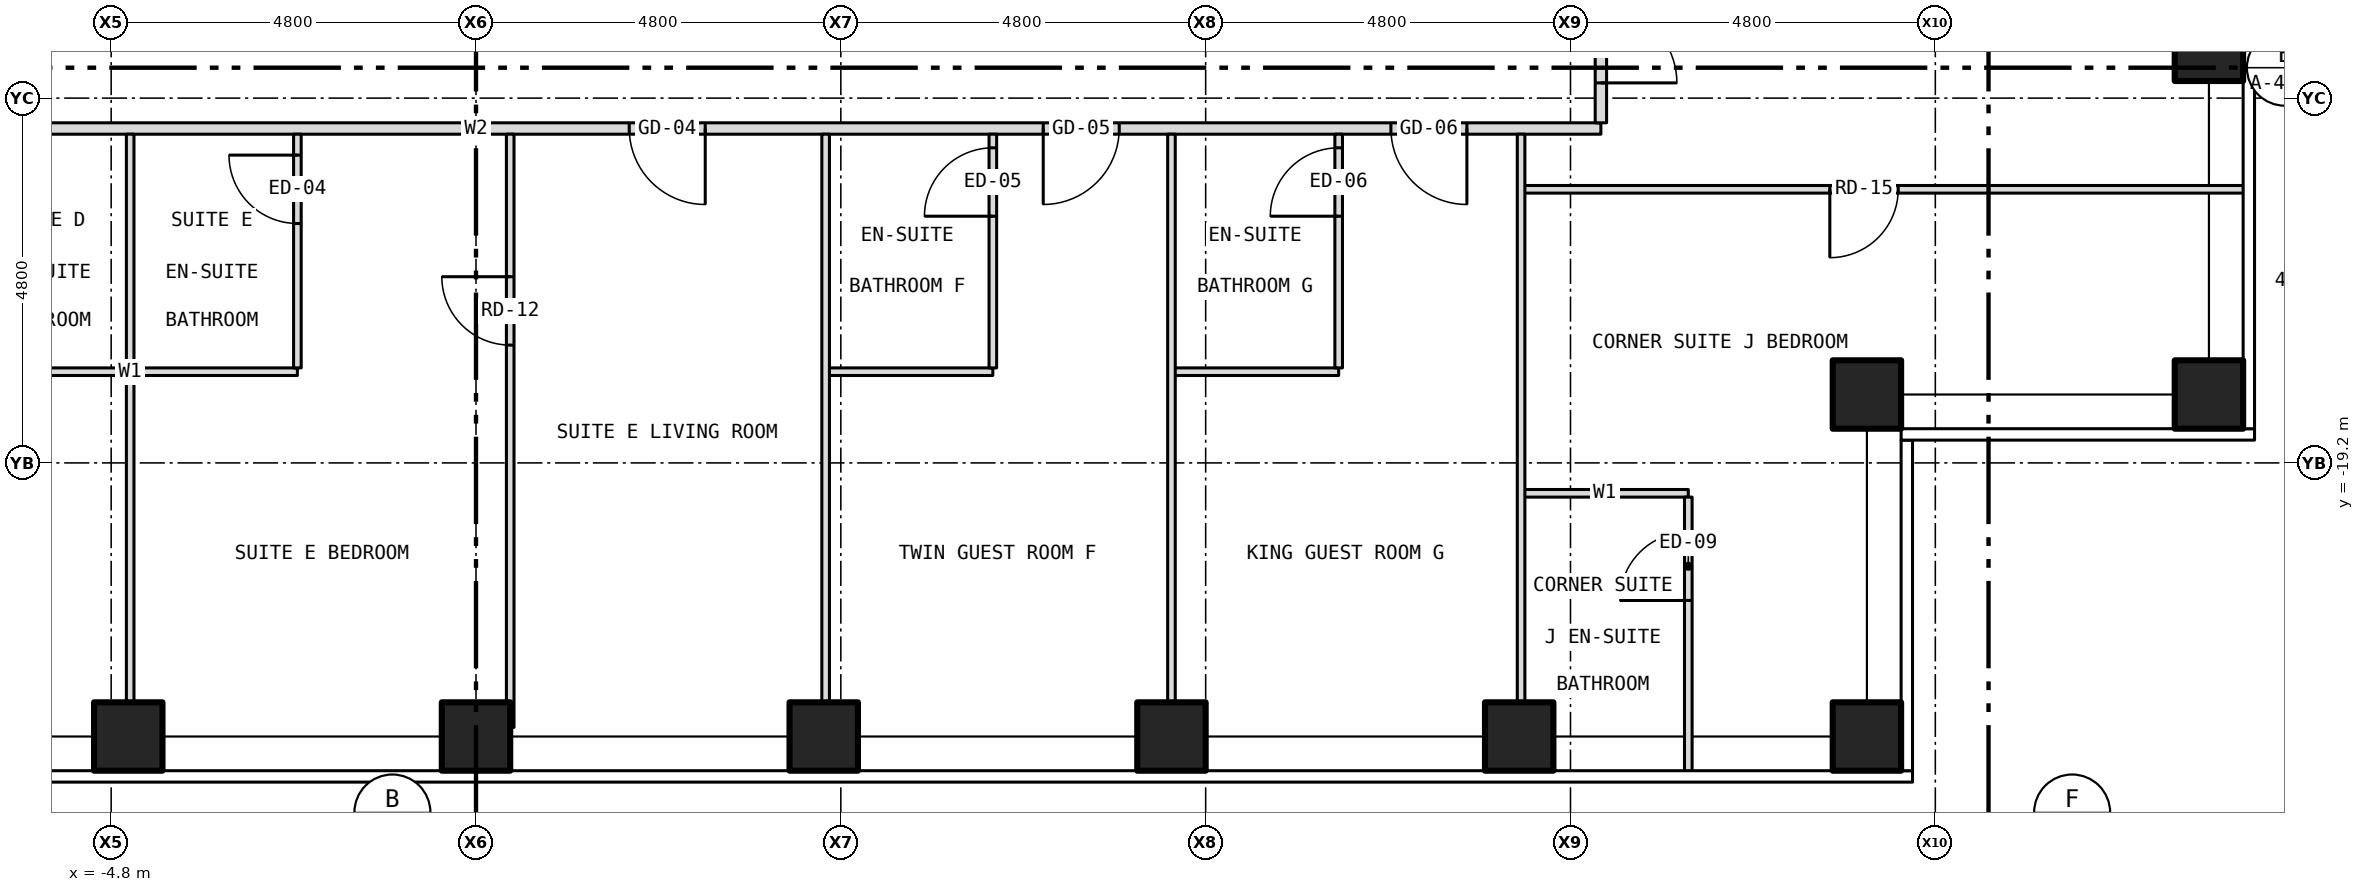
"""IFC4 building model, lengths in metres.
Left out: names, types, materials, properties, quantities, classifications, styles, units other than length and angle.
Written with IfcOpenShell. Run it as: python <this file> out.ifc"""

import sys

from ifc_helpers import new_model, si_unit, direction, frame, frame_2d, origin, origin_2d, place, context, subcontext, project, spatial, rectangle, hollow_rectangle, extrude, element, fill, save


model = new_model("IFC4")
c1 = context("Model", 3, precision=1e-05, world=origin(), true_north=direction((0.0, 1.0)))
c2 = subcontext(c1, "Body", "Model", "MODEL_VIEW")
j1 = project(units=[si_unit("LENGTHUNIT", "METRE"), si_unit("PLANEANGLEUNIT", "RADIAN")], contexts=[c1])
p1 = place(None, origin())
s1 = spatial("IfcSite", under=j1, at=p1, CompositionType="ELEMENT")
p2 = place(p1, origin())
s2 = spatial("IfcBuilding", under=s1, at=p2, CompositionType="ELEMENT")
p3 = place(p2, frame((0.0, 0.0, 99.5)))
s3 = spatial("IfcBuildingStorey", under=s2, at=p3, CompositionType="ELEMENT", Elevation=99.5)
for number, where, z_axis, x_axis in (
    (1, (-4.575, -22.8, -0.15), (0.0, 0.0, 1.0), (1.0, 0.0, 0.0)),
    (2, (0.0, -22.8, -0.15), (0.0, 0.0, 1.0), (1.0, 0.0, 0.0)),
    (3, (4.575, -22.8, -0.15), (0.0, 0.0, 1.0), (1.0, 0.0, 0.0)),
    (4, (9.15, -22.8, -0.15), (0.0, 0.0, 1.0), (1.0, 0.0, 0.0)),
    (5, (13.725, -22.8, -0.15), (0.0, 0.0, 1.0), (1.0, 0.0, 0.0)),
    (6, (18.3, -22.8, -0.15), (0.0, 0.0, 1.0), (1.0, 0.0, 0.0)),
    (7, (22.8, -18.3, -0.15), (0.0, 0.0, 1.0), (1.0, 0.0, 0.0)),
    (8, (22.8, -13.725, -0.15), (0.0, 0.0, 1.0), (1.0, 0.0, 0.0)),
    (9, (18.3, -18.3, -0.15), (0.0, 0.0, 1.0), (1.0, 0.0, 0.0)),
):
    element("IfcColumn", number, at=place(p3, frame(where, z_axis=z_axis, x_axis=x_axis)), inside=s3, PredefinedType="COLUMN", context=c2, shape_type="SweptSolid", body=[
        extrude(hollow_rectangle(XDim=0.9, YDim=0.9, WallThickness=0.05, at=origin_2d()), origin(), (0.0, 0.0, 1.0), 3.5),
    ])
p4 = place(p3, frame((13.75, -19.6, 0.0), z_axis=(0.0, 0.0, 1.0), x_axis=(1.0, 0.0, 0.0)))
e10 = element("IfcWall", 10, at=p4, inside=s3, PredefinedType="PARTITIONING", context=c2, shape_type="SweptSolid", body=[
    extrude(rectangle(XDim=2.2, YDim=0.1, at=frame_2d((1.1, 0.0))), origin(), (0.0, 0.0, 1.0), 3.35),
])
p5 = place(p3, frame((-6.75, -18.0, 0.0), z_axis=(0.0, 0.0, 1.0), x_axis=(1.0, 0.0, 0.0)))
e11 = element("IfcWall", 11, at=p5, inside=s3, PredefinedType="PARTITIONING", context=c2, shape_type="SweptSolid", body=[
    extrude(rectangle(XDim=4.4, YDim=0.1, at=frame_2d((2.2, 0.0))), origin(), (0.0, 0.0, 1.0), 3.35),
])
p6 = place(p3, frame((4.6, -18.0, 0.0), z_axis=(0.0, 0.0, 1.0), x_axis=(1.0, 0.0, 0.0)))
e12 = element("IfcWall", 12, at=p6, inside=s3, PredefinedType="PARTITIONING", context=c2, shape_type="SweptSolid", body=[
    extrude(rectangle(XDim=2.2, YDim=0.1, at=frame_2d((1.1, 0.0))), origin(), (0.0, 0.0, 1.0), 3.35),
])
p7 = place(p3, frame((9.15, -18.0, 0.0), z_axis=(0.0, 0.0, 1.0), x_axis=(1.0, 0.0, 0.0)))
e13 = element("IfcWall", 13, at=p7, inside=s3, PredefinedType="PARTITIONING", context=c2, shape_type="SweptSolid", body=[
    extrude(rectangle(XDim=2.2, YDim=0.1, at=frame_2d((1.1, 0.0))), origin(), (0.0, 0.0, 1.0), 3.35),
])
p8 = place(p3, frame((13.75, -15.6, 0.0), z_axis=(0.0, 0.0, 1.0), x_axis=(1.0, 0.0, 0.0)))
e14 = element("IfcWall", 14, at=p8, inside=s3, PredefinedType="PARTITIONING", context=c2, shape_type="SweptSolid", body=[
    extrude(rectangle(XDim=9.53, YDim=0.1, at=frame_2d((4.765, 0.0))), origin(), (0.0, 0.0, 1.0), 3.35),
])
p9 = place(p8, frame((4.062, 0.0, 0.0)))
e15 = element("IfcOpeningElement", 15, at=p9, cuts=e14, PredefinedType="OPENING", context=c2, shape_type="SweptSolid", body=[
    extrude(rectangle(XDim=0.9, YDim=2.1, at=frame_2d((0.45, 1.05))), frame((0.0, 0.062, 0.0), z_axis=(0.0, -1.0, 0.0), x_axis=(1.0, 0.0, 0.0)), (0.0, 0.0, 1.0), 0.124),
])
p10 = place(p3, frame((-14.8, -14.8, 0.0), z_axis=(0.0, 0.0, 1.0), x_axis=(1.0, 0.0, 0.0)))
e16 = element("IfcWall", 16, at=p10, inside=s3, PredefinedType="PARTITIONING", context=c2, shape_type="SweptSolid", body=[
    extrude(rectangle(XDim=29.6, YDim=0.15, at=frame_2d((14.8, 0.0))), origin(), (0.0, 0.0, 1.0), 3.35),
])
p11 = place(p10, frame((2.634, 0.0, 0.0)))
e17 = element("IfcOpeningElement", 17, at=p11, cuts=e16, PredefinedType="OPENING", context=c2, shape_type="SweptSolid", body=[
    extrude(rectangle(XDim=1.0, YDim=2.1, at=frame_2d((0.5, 1.05))), frame((0.0, 0.087, 0.0), z_axis=(0.0, -1.0, 0.0), x_axis=(1.0, 0.0, 0.0)), (0.0, 0.0, 1.0), 0.174),
])
p12 = place(p10, frame((16.816, 0.0, 0.0)))
e18 = element("IfcOpeningElement", 18, at=p12, cuts=e16, PredefinedType="OPENING", context=c2, shape_type="SweptSolid", body=[
    extrude(rectangle(XDim=1.0, YDim=2.1, at=frame_2d((0.5, 1.05))), frame((0.0, 0.087, 0.0), z_axis=(0.0, -1.0, 0.0), x_axis=(1.0, 0.0, 0.0)), (0.0, 0.0, 1.0), 0.174),
])
p13 = place(p10, frame((22.263, 0.0, 0.0)))
e19 = element("IfcOpeningElement", 19, at=p13, cuts=e16, PredefinedType="OPENING", context=c2, shape_type="SweptSolid", body=[
    extrude(rectangle(XDim=1.0, YDim=2.1, at=frame_2d((0.5, 1.05))), frame((0.0, 0.087, 0.0), z_axis=(0.0, -1.0, 0.0), x_axis=(1.0, 0.0, 0.0)), (0.0, 0.0, 1.0), 0.174),
])
p14 = place(p10, frame((26.837, 0.0, 0.0)))
e20 = element("IfcOpeningElement", 20, at=p14, cuts=e16, PredefinedType="OPENING", context=c2, shape_type="SweptSolid", body=[
    extrude(rectangle(XDim=1.0, YDim=2.1, at=frame_2d((0.5, 1.05))), frame((0.0, 0.087, 0.0), z_axis=(0.0, -1.0, 0.0), x_axis=(1.0, 0.0, 0.0)), (0.0, 0.0, 1.0), 0.174),
])
p15 = place(p3, frame((-4.55, -22.68, 0.0), z_axis=(0.0, 0.0, 1.0), x_axis=(0.0, 1.0, 0.0)))
e21 = element("IfcWall", 21, at=p15, inside=s3, PredefinedType="PARTITIONING", context=c2, shape_type="SweptSolid", body=[
    extrude(rectangle(XDim=4.63, YDim=0.1, at=frame_2d((2.315, 0.0))), origin(), (0.0, 0.0, 1.0), 3.35),
])
p16 = place(p3, frame((-4.55, -17.95, 0.0), z_axis=(0.0, 0.0, 1.0), x_axis=(0.0, 1.0, 0.0)))
e22 = element("IfcWall", 22, at=p16, inside=s3, PredefinedType="PARTITIONING", context=c2, shape_type="SweptSolid", body=[
    extrude(rectangle(XDim=3.075, YDim=0.1, at=frame_2d((1.538, 0.0))), origin(), (0.0, 0.0, 1.0), 3.35),
])
p17 = place(p3, frame((-2.35, -17.95, 0.0), z_axis=(0.0, 0.0, 1.0), x_axis=(0.0, 1.0, 0.0)))
e23 = element("IfcWall", 23, at=p17, inside=s3, PredefinedType="PARTITIONING", context=c2, shape_type="SweptSolid", body=[
    extrude(rectangle(XDim=3.075, YDim=0.1, at=frame_2d((1.538, 0.0))), origin(), (0.0, 0.0, 1.0), 3.35),
])
p18 = place(p17, frame((1.9, 0.0, 0.0)))
e24 = element("IfcOpeningElement", 24, at=p18, cuts=e23, PredefinedType="OPENING", context=c2, shape_type="SweptSolid", body=[
    extrude(rectangle(XDim=0.9, YDim=2.1, at=frame_2d((0.45, 1.05))), frame((0.0, 0.062, 0.0), z_axis=(0.0, -1.0, 0.0), x_axis=(1.0, 0.0, 0.0)), (0.0, 0.0, 1.0), 0.124),
])
p19 = place(p3, frame((0.45, -22.68, 0.0), z_axis=(0.0, 0.0, 1.0), x_axis=(0.0, 1.0, 0.0)))
e25 = element("IfcWall", 25, at=p19, inside=s3, PredefinedType="PARTITIONING", context=c2, shape_type="SweptSolid", body=[
    extrude(rectangle(XDim=7.805, YDim=0.1, at=frame_2d((3.902, 0.0))), origin(), (0.0, 0.0, 1.0), 3.35),
])
p20 = place(p19, frame((5.03, 0.0, 0.0)))
e26 = element("IfcOpeningElement", 26, at=p20, cuts=e25, PredefinedType="OPENING", context=c2, shape_type="SweptSolid", body=[
    extrude(rectangle(XDim=0.9, YDim=2.1, at=frame_2d((0.45, 1.05))), frame((0.0, 0.062, 0.0), z_axis=(0.0, -1.0, 0.0), x_axis=(1.0, 0.0, 0.0)), (0.0, 0.0, 1.0), 0.124),
])
p21 = place(p3, frame((4.6, -22.68, 0.0), z_axis=(0.0, 0.0, 1.0), x_axis=(0.0, 1.0, 0.0)))
e27 = element("IfcWall", 27, at=p21, inside=s3, PredefinedType="PARTITIONING", context=c2, shape_type="SweptSolid", body=[
    extrude(rectangle(XDim=7.805, YDim=0.1, at=frame_2d((3.902, 0.0))), origin(), (0.0, 0.0, 1.0), 3.35),
])
p22 = place(p3, frame((6.8, -17.95, 0.0), z_axis=(0.0, 0.0, 1.0), x_axis=(0.0, 1.0, 0.0)))
e28 = element("IfcWall", 28, at=p22, inside=s3, PredefinedType="PARTITIONING", context=c2, shape_type="SweptSolid", body=[
    extrude(rectangle(XDim=3.075, YDim=0.1, at=frame_2d((1.538, 0.0))), origin(), (0.0, 0.0, 1.0), 3.35),
])
p23 = place(p22, frame((1.996, 0.0, 0.0)))
e29 = element("IfcOpeningElement", 29, at=p23, cuts=e28, PredefinedType="OPENING", context=c2, shape_type="SweptSolid", body=[
    extrude(rectangle(XDim=0.9, YDim=2.1, at=frame_2d((0.45, 1.05))), frame((0.0, 0.062, 0.0), z_axis=(0.0, -1.0, 0.0), x_axis=(1.0, 0.0, 0.0)), (0.0, 0.0, 1.0), 0.124),
])
p24 = place(p3, frame((9.15, -22.68, 0.0), z_axis=(0.0, 0.0, 1.0), x_axis=(0.0, 1.0, 0.0)))
e30 = element("IfcWall", 30, at=p24, inside=s3, PredefinedType="PARTITIONING", context=c2, shape_type="SweptSolid", body=[
    extrude(rectangle(XDim=7.805, YDim=0.1, at=frame_2d((3.902, 0.0))), origin(), (0.0, 0.0, 1.0), 3.35),
])
p25 = place(p3, frame((11.35, -17.95, 0.0), z_axis=(0.0, 0.0, 1.0), x_axis=(0.0, 1.0, 0.0)))
e31 = element("IfcWall", 31, at=p25, inside=s3, PredefinedType="PARTITIONING", context=c2, shape_type="SweptSolid", body=[
    extrude(rectangle(XDim=3.075, YDim=0.1, at=frame_2d((1.538, 0.0))), origin(), (0.0, 0.0, 1.0), 3.35),
])
p26 = place(p25, frame((1.996, 0.0, 0.0)))
e32 = element("IfcOpeningElement", 32, at=p26, cuts=e31, PredefinedType="OPENING", context=c2, shape_type="SweptSolid", body=[
    extrude(rectangle(XDim=0.9, YDim=2.1, at=frame_2d((0.45, 1.05))), frame((0.0, 0.062, 0.0), z_axis=(0.0, -1.0, 0.0), x_axis=(1.0, 0.0, 0.0)), (0.0, 0.0, 1.0), 0.124),
])
p27 = place(p3, frame((13.75, -22.68, 0.0), z_axis=(0.0, 0.0, 1.0), x_axis=(0.0, 1.0, 0.0)))
e33 = element("IfcWall", 33, at=p27, inside=s3, PredefinedType="PARTITIONING", context=c2, shape_type="SweptSolid", body=[
    extrude(rectangle(XDim=7.805, YDim=0.1, at=frame_2d((3.902, 0.0))), origin(), (0.0, 0.0, 1.0), 3.35),
])
p28 = place(p3, frame((14.8, -14.725, 0.0), z_axis=(0.0, 0.0, 1.0), x_axis=(0.0, 1.0, 0.0)))
e34 = element("IfcWall", 34, at=p28, inside=s3, PredefinedType="PARTITIONING", context=c2, shape_type="SweptSolid", body=[
    extrude(rectangle(XDim=3.85, YDim=0.15, at=frame_2d((1.925, 0.0))), origin(), (0.0, 0.0, 1.0), 3.35),
])
p29 = place(p28, frame((0.525, 0.0, 0.0)))
e35 = element("IfcOpeningElement", 35, at=p29, cuts=e34, PredefinedType="OPENING", context=c2, shape_type="SweptSolid", body=[
    extrude(rectangle(XDim=1.0, YDim=2.1, at=frame_2d((0.5, 1.05))), frame((0.0, 0.087, 0.0), z_axis=(0.0, -1.0, 0.0), x_axis=(1.0, 0.0, 0.0)), (0.0, 0.0, 1.0), 0.174),
])
p30 = place(p3, frame((15.95, -23.28, 0.0), z_axis=(0.0, 0.0, 1.0), x_axis=(0.0, 1.0, 0.0)))
e36 = element("IfcWall", 36, at=p30, inside=s3, PredefinedType="PARTITIONING", context=c2, shape_type="SweptSolid", body=[
    extrude(rectangle(XDim=3.63, YDim=0.1, at=frame_2d((1.815, 0.0))), origin(), (0.0, 0.0, 1.0), 3.35),
])
p31 = place(p30, frame((2.27, 0.0, 0.0)))
e37 = element("IfcOpeningElement", 37, at=p31, cuts=e36, PredefinedType="OPENING", context=c2, shape_type="SweptSolid", body=[
    extrude(rectangle(XDim=0.9, YDim=2.1, at=frame_2d((0.45, 1.05))), frame((0.0, 0.062, 0.0), z_axis=(0.0, -1.0, 0.0), x_axis=(1.0, 0.0, 0.0)), (0.0, 0.0, 1.0), 0.124),
])
p32 = place(p12, origin())
e38 = element("IfcDoor", 38, at=p32, inside=s3, OperationType="SINGLE_SWING_RIGHT", PredefinedType="DOOR", context=c2, shape_type="SweptSolid", body=[
    extrude(rectangle(XDim=1.0, YDim=2.1, at=frame_2d((0.5, 1.05))), frame((0.0, 0.025, 0.0), z_axis=(0.0, -1.0, 0.0), x_axis=(1.0, 0.0, 0.0)), (0.0, 0.0, 1.0), 0.05),
])
fill(e18, e38)
p33 = place(p20, origin())
e39 = element("IfcDoor", 39, at=p33, inside=s3, OperationType="SINGLE_SWING_RIGHT", PredefinedType="DOOR", context=c2, shape_type="SweptSolid", body=[
    extrude(rectangle(XDim=0.9, YDim=2.1, at=frame_2d((0.45, 1.05))), frame((0.0, 0.025, 0.0), z_axis=(0.0, -1.0, 0.0), x_axis=(1.0, 0.0, 0.0)), (0.0, 0.0, 1.0), 0.05),
])
fill(e26, e39)
p34 = place(p18, origin())
e40 = element("IfcDoor", 40, at=p34, inside=s3, OperationType="SINGLE_SWING_RIGHT", PredefinedType="DOOR", context=c2, shape_type="SweptSolid", body=[
    extrude(rectangle(XDim=0.9, YDim=2.1, at=frame_2d((0.45, 1.05))), frame((0.0, 0.025, 0.0), z_axis=(0.0, -1.0, 0.0), x_axis=(1.0, 0.0, 0.0)), (0.0, 0.0, 1.0), 0.05),
])
fill(e24, e40)
p35 = place(p13, origin())
e41 = element("IfcDoor", 41, at=p35, inside=s3, OperationType="SINGLE_SWING_LEFT", PredefinedType="DOOR", context=c2, shape_type="SweptSolid", body=[
    extrude(rectangle(XDim=1.0, YDim=2.1, at=frame_2d((0.5, 1.05))), frame((0.0, 0.025, 0.0), z_axis=(0.0, -1.0, 0.0), x_axis=(1.0, 0.0, 0.0)), (0.0, 0.0, 1.0), 0.05),
])
fill(e19, e41)
p36 = place(p23, origin())
e42 = element("IfcDoor", 42, at=p36, inside=s3, OperationType="SINGLE_SWING_LEFT", PredefinedType="DOOR", context=c2, shape_type="SweptSolid", body=[
    extrude(rectangle(XDim=0.9, YDim=2.1, at=frame_2d((0.45, 1.05))), frame((0.0, 0.025, 0.0), z_axis=(0.0, -1.0, 0.0), x_axis=(1.0, 0.0, 0.0)), (0.0, 0.0, 1.0), 0.05),
])
fill(e29, e42)
p37 = place(p14, origin())
e43 = element("IfcDoor", 43, at=p37, inside=s3, OperationType="SINGLE_SWING_RIGHT", PredefinedType="DOOR", context=c2, shape_type="SweptSolid", body=[
    extrude(rectangle(XDim=1.0, YDim=2.1, at=frame_2d((0.5, 1.05))), frame((0.0, 0.025, 0.0), z_axis=(0.0, -1.0, 0.0), x_axis=(1.0, 0.0, 0.0)), (0.0, 0.0, 1.0), 0.05),
])
fill(e20, e43)
p38 = place(p26, origin())
e44 = element("IfcDoor", 44, at=p38, inside=s3, OperationType="SINGLE_SWING_LEFT", PredefinedType="DOOR", context=c2, shape_type="SweptSolid", body=[
    extrude(rectangle(XDim=0.9, YDim=2.1, at=frame_2d((0.45, 1.05))), frame((0.0, 0.025, 0.0), z_axis=(0.0, -1.0, 0.0), x_axis=(1.0, 0.0, 0.0)), (0.0, 0.0, 1.0), 0.05),
])
fill(e32, e44)
p39 = place(p29, origin())
e45 = element("IfcDoor", 45, at=p39, inside=s3, OperationType="SINGLE_SWING_LEFT", PredefinedType="DOOR", context=c2, shape_type="SweptSolid", body=[
    extrude(rectangle(XDim=1.0, YDim=2.1, at=frame_2d((0.5, 1.05))), frame((0.0, 0.025, 0.0), z_axis=(0.0, -1.0, 0.0), x_axis=(1.0, 0.0, 0.0)), (0.0, 0.0, 1.0), 0.05),
])
fill(e35, e45)
p40 = place(p9, origin())
e46 = element("IfcDoor", 46, at=p40, inside=s3, OperationType="SINGLE_SWING_LEFT", PredefinedType="DOOR", context=c2, shape_type="SweptSolid", body=[
    extrude(rectangle(XDim=0.9, YDim=2.1, at=frame_2d((0.45, 1.05))), frame((0.0, 0.025, 0.0), z_axis=(0.0, -1.0, 0.0), x_axis=(1.0, 0.0, 0.0)), (0.0, 0.0, 1.0), 0.05),
])
fill(e15, e46)
p41 = place(p31, origin())
e47 = element("IfcDoor", 47, at=p41, inside=s3, OperationType="SINGLE_SWING_LEFT", PredefinedType="DOOR", context=c2, shape_type="SweptSolid", body=[
    extrude(rectangle(XDim=0.9, YDim=2.1, at=frame_2d((0.45, 1.05))), frame((0.0, 0.025, 0.0), z_axis=(0.0, -1.0, 0.0), x_axis=(1.0, 0.0, 0.0)), (0.0, 0.0, 1.0), 0.05),
])
fill(e37, e47)
save(model, sys.argv[1])
